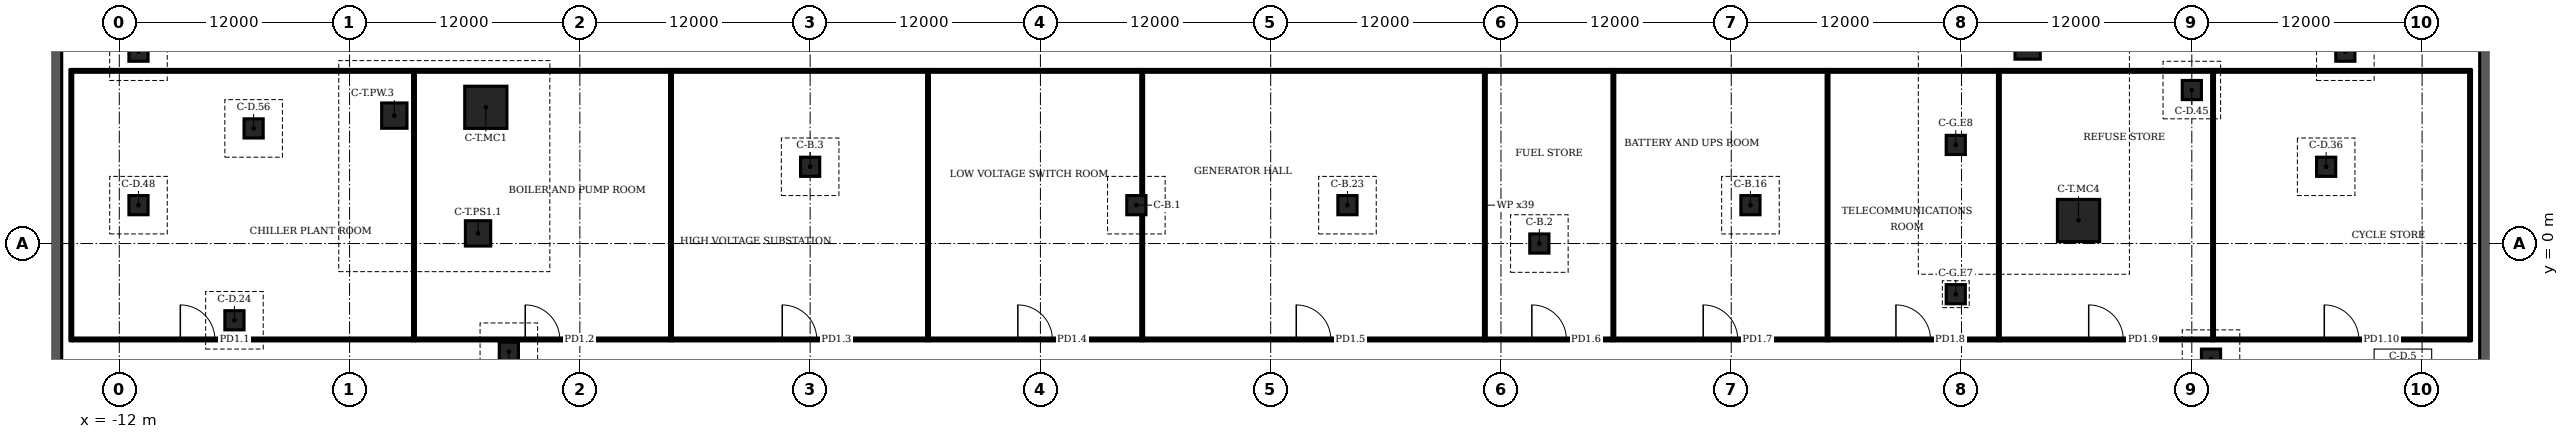
"""IFC4 building model, lengths in metres.
Left out: names, types, materials, properties, quantities, classifications, styles, units other than length and angle.
Written with IfcOpenShell. Run it as: python <this file> out.ifc"""

import sys

from ifc_helpers import new_model, si_unit, direction, frame, frame_2d, origin, origin_2d, place, context, subcontext, project, spatial, rectangle, extrude, element, fill, save


model = new_model("IFC4")
c1 = context("Model", 3, precision=1e-05, world=origin(), true_north=direction((0.0, 1.0)))
c2 = subcontext(c1, "Body", "Model", "MODEL_VIEW")
j1 = project(units=[si_unit("LENGTHUNIT", "METRE"), si_unit("PLANEANGLEUNIT", "RADIAN")], contexts=[c1])
p1 = place(None, origin())
s1 = spatial("IfcSite", under=j1, at=p1, CompositionType="ELEMENT")
p2 = place(p1, origin())
s2 = spatial("IfcBuilding", under=s1, at=p2, CompositionType="ELEMENT")
p3 = place(p2, frame((0.0, 0.0, -7.2)))
s3 = spatial("IfcBuildingStorey", under=s2, at=p3, CompositionType="ELEMENT", Elevation=-7.2)
for number, where, z_axis, x_axis in (
    (1, (-15.5, -35.0, 0.0), (0.0, 0.0, 1.0), (0.0, 1.0, 0.0)),
    (2, (111.5, -35.0, 0.0), (0.0, 0.0, 1.0), (0.0, 1.0, 0.0)),
):
    element("IfcWall", number, at=place(p3, frame(where, z_axis=z_axis, x_axis=x_axis)), inside=s3, PredefinedType="SOLIDWALL", context=c2, shape_type="SweptSolid", body=[
        extrude(rectangle(XDim=94.0, YDim=1.0, at=frame_2d((47.0, 0.0))), origin(), (0.0, 0.0, 1.0), 6.6),
    ])
for number, where, z_axis, x_axis in (
    (3, (7.1, 7.1, 0.0), (0.0, 0.0, 1.0), (1.0, 0.0, 0.0)),
    (4, (90.096, 1.2, 0.0), (0.0, 0.0, 1.0), (1.0, 0.0, 0.0)),
):
    element("IfcColumn", number, at=place(p3, frame(where, z_axis=z_axis, x_axis=x_axis)), inside=s3, PredefinedType="COLUMN", context=c2, shape_type="SweptSolid", body=[
        extrude(rectangle(XDim=2.2, YDim=2.2, at=origin_2d()), origin(), (0.0, 0.0, 1.0), 7.2),
    ])
for number, where, z_axis, x_axis in (
    (5, (6.694, 0.529, 0.0), (0.0, 0.0, 1.0), (1.0, 0.0, 0.0)),
    (6, (87.445, 10.268, 0.0), (0.0, 0.0, 1.0), (1.0, 0.0, 0.0)),
    (7, (2.332, 6.667, 0.0), (0.0, 0.0, 1.0), (1.0, 0.0, 0.0)),
):
    element("IfcColumn", number, at=place(p3, frame(where, z_axis=z_axis, x_axis=x_axis)), inside=s3, PredefinedType="COLUMN", context=c2, shape_type="SweptSolid", body=[
        extrude(rectangle(XDim=1.32, YDim=1.32, at=origin_2d()), origin(), (0.0, 0.0, 1.0), 7.2),
    ])
for number, where, z_axis, x_axis in (
    (8, (8.3, -5.64, 0.0), (0.0, 0.0, 1.0), (1.0, 0.0, 0.0)),
    (9, (83.7, -2.64, 0.0), (0.0, 0.0, 1.0), (1.0, 0.0, 0.0)),
    (10, (83.7, 5.14, 0.0), (0.0, 0.0, 1.0), (1.0, 0.0, 0.0)),
    (11, (104.0, 10.0, 0.0), (0.0, 0.0, 1.0), (1.0, 0.0, 0.0)),
    (12, (-11.0, 10.0, 0.0), (0.0, 0.0, 1.0), (1.0, 0.0, 0.0)),
    (13, (-6.0, -4.0, 0.0), (0.0, 0.0, 1.0), (1.0, 0.0, 0.0)),
    (14, (97.0, -6.0, 0.0), (0.0, 0.0, 1.0), (1.0, 0.0, 0.0)),
    (15, (103.0, 4.0, 0.0), (0.0, 0.0, 1.0), (1.0, 0.0, 0.0)),
    (16, (96.0, 8.0, 0.0), (0.0, 0.0, 1.0), (1.0, 0.0, 0.0)),
    (17, (-11.0, 2.0, 0.0), (0.0, 0.0, 1.0), (1.0, 0.0, 0.0)),
    (18, (-5.0, 6.0, 0.0), (0.0, 0.0, 1.0), (1.0, 0.0, 0.0)),
    (19, (41.0, 2.0, 0.0), (0.0, 0.0, 1.0), (1.0, 0.0, 0.0)),
    (20, (62.0, 0.0, 0.0), (0.0, 0.0, 1.0), (1.0, 0.0, 0.0)),
    (21, (24.0, 4.0, 0.0), (0.0, 0.0, 1.0), (1.0, 0.0, 0.0)),
    (22, (73.0, 2.0, 0.0), (0.0, 0.0, 1.0), (1.0, 0.0, 0.0)),
    (23, (52.0, 2.0, 0.0), (0.0, 0.0, 1.0), (1.0, 0.0, 0.0)),
):
    element("IfcColumn", number, at=place(p3, frame(where, z_axis=z_axis, x_axis=x_axis)), inside=s3, PredefinedType="COLUMN", context=c2, shape_type="SweptSolid", body=[
        extrude(rectangle(XDim=1.0, YDim=1.0, at=origin_2d()), origin(), (0.0, 0.0, 1.0), 7.2),
    ])
p4 = place(p3, frame((-14.425, -5.0, 0.0), z_axis=(0.0, 0.0, 1.0), x_axis=(1.0, 0.0, 0.0)))
e24 = element("IfcWall", 24, at=p4, inside=s3, PredefinedType="PARTITIONING", context=c2, shape_type="SweptSolid", body=[
    extrude(rectangle(XDim=17.707, YDim=0.15, at=frame_2d((8.854, 0.0))), origin(), (0.0, 0.0, 1.0), 6.9),
])
p5 = place(p4, frame((5.605, 0.0, 0.0)))
e25 = element("IfcOpeningElement", 25, at=p5, cuts=e24, PredefinedType="OPENING", context=c2, shape_type="SweptSolid", body=[
    extrude(rectangle(XDim=1.8, YDim=2.1, at=frame_2d((0.9, 1.05))), frame((0.0, 0.085, 0.0), z_axis=(0.0, -1.0, 0.0), x_axis=(1.0, 0.0, 0.0)), (0.0, 0.0, 1.0), 0.17),
])
p6 = place(p3, frame((3.432, -5.0, 0.0), z_axis=(0.0, 0.0, 1.0), x_axis=(1.0, 0.0, 0.0)))
e26 = element("IfcWall", 26, at=p6, inside=s3, PredefinedType="PARTITIONING", context=c2, shape_type="SweptSolid", body=[
    extrude(rectangle(XDim=13.243, YDim=0.15, at=frame_2d((6.622, 0.0))), origin(), (0.0, 0.0, 1.0), 6.9),
])
p7 = place(p6, frame((5.722, 0.0, 0.0)))
e27 = element("IfcOpeningElement", 27, at=p7, cuts=e26, PredefinedType="OPENING", context=c2, shape_type="SweptSolid", body=[
    extrude(rectangle(XDim=1.8, YDim=2.1, at=frame_2d((0.9, 1.05))), frame((0.0, 0.085, 0.0), z_axis=(0.0, -1.0, 0.0), x_axis=(1.0, 0.0, 0.0)), (0.0, 0.0, 1.0), 0.17),
])
p8 = place(p3, frame((16.825, -5.0, 0.0), z_axis=(0.0, 0.0, 1.0), x_axis=(1.0, 0.0, 0.0)))
e28 = element("IfcWall", 28, at=p8, inside=s3, PredefinedType="PARTITIONING", context=c2, shape_type="SweptSolid", body=[
    extrude(rectangle(XDim=13.243, YDim=0.15, at=frame_2d((6.622, 0.0))), origin(), (0.0, 0.0, 1.0), 6.9),
])
p9 = place(p8, frame((5.721, 0.0, 0.0)))
e29 = element("IfcOpeningElement", 29, at=p9, cuts=e28, PredefinedType="OPENING", context=c2, shape_type="SweptSolid", body=[
    extrude(rectangle(XDim=1.8, YDim=2.1, at=frame_2d((0.9, 1.05))), frame((0.0, 0.085, 0.0), z_axis=(0.0, -1.0, 0.0), x_axis=(1.0, 0.0, 0.0)), (0.0, 0.0, 1.0), 0.17),
])
p10 = place(p3, frame((30.218, -5.0, 0.0), z_axis=(0.0, 0.0, 1.0), x_axis=(1.0, 0.0, 0.0)))
e30 = element("IfcWall", 30, at=p10, inside=s3, PredefinedType="PARTITIONING", context=c2, shape_type="SweptSolid", body=[
    extrude(rectangle(XDim=11.011, YDim=0.15, at=frame_2d((5.505, 0.0))), origin(), (0.0, 0.0, 1.0), 6.9),
])
p11 = place(p10, frame((4.605, 0.0, 0.0)))
e31 = element("IfcOpeningElement", 31, at=p11, cuts=e30, PredefinedType="OPENING", context=c2, shape_type="SweptSolid", body=[
    extrude(rectangle(XDim=1.8, YDim=2.1, at=frame_2d((0.9, 1.05))), frame((0.0, 0.085, 0.0), z_axis=(0.0, -1.0, 0.0), x_axis=(1.0, 0.0, 0.0)), (0.0, 0.0, 1.0), 0.17),
])
p12 = place(p3, frame((41.379, -5.0, 0.0), z_axis=(0.0, 0.0, 1.0), x_axis=(1.0, 0.0, 0.0)))
e32 = element("IfcWall", 32, at=p12, inside=s3, PredefinedType="PARTITIONING", context=c2, shape_type="SweptSolid", body=[
    extrude(rectangle(XDim=17.707, YDim=0.15, at=frame_2d((8.854, 0.0))), origin(), (0.0, 0.0, 1.0), 6.9),
])
p13 = place(p12, frame((7.953, 0.0, 0.0)))
e33 = element("IfcOpeningElement", 33, at=p13, cuts=e32, PredefinedType="OPENING", context=c2, shape_type="SweptSolid", body=[
    extrude(rectangle(XDim=1.8, YDim=2.1, at=frame_2d((0.9, 1.05))), frame((0.0, 0.085, 0.0), z_axis=(0.0, -1.0, 0.0), x_axis=(1.0, 0.0, 0.0)), (0.0, 0.0, 1.0), 0.17),
])
p14 = place(p3, frame((59.236, -5.0, 0.0), z_axis=(0.0, 0.0, 1.0), x_axis=(1.0, 0.0, 0.0)))
e34 = element("IfcWall", 34, at=p14, inside=s3, PredefinedType="PARTITIONING", context=c2, shape_type="SweptSolid", body=[
    extrude(rectangle(XDim=6.546, YDim=0.15, at=frame_2d((3.273, 0.0))), origin(), (0.0, 0.0, 1.0), 6.9),
])
p15 = place(p14, frame((2.373, 0.0, 0.0)))
e35 = element("IfcOpeningElement", 35, at=p15, cuts=e34, PredefinedType="OPENING", context=c2, shape_type="SweptSolid", body=[
    extrude(rectangle(XDim=1.8, YDim=2.1, at=frame_2d((0.9, 1.05))), frame((0.0, 0.085, 0.0), z_axis=(0.0, -1.0, 0.0), x_axis=(1.0, 0.0, 0.0)), (0.0, 0.0, 1.0), 0.17),
])
p16 = place(p3, frame((65.932, -5.0, 0.0), z_axis=(0.0, 0.0, 1.0), x_axis=(1.0, 0.0, 0.0)))
e36 = element("IfcWall", 36, at=p16, inside=s3, PredefinedType="PARTITIONING", context=c2, shape_type="SweptSolid", body=[
    extrude(rectangle(XDim=11.011, YDim=0.15, at=frame_2d((5.506, 0.0))), origin(), (0.0, 0.0, 1.0), 6.9),
])
p17 = place(p16, frame((4.605, 0.0, 0.0)))
e37 = element("IfcOpeningElement", 37, at=p17, cuts=e36, PredefinedType="OPENING", context=c2, shape_type="SweptSolid", body=[
    extrude(rectangle(XDim=1.8, YDim=2.1, at=frame_2d((0.9, 1.05))), frame((0.0, 0.085, 0.0), z_axis=(0.0, -1.0, 0.0), x_axis=(1.0, 0.0, 0.0)), (0.0, 0.0, 1.0), 0.17),
])
p18 = place(p3, frame((77.093, -5.0, 0.0), z_axis=(0.0, 0.0, 1.0), x_axis=(1.0, 0.0, 0.0)))
e38 = element("IfcWall", 38, at=p18, inside=s3, PredefinedType="PARTITIONING", context=c2, shape_type="SweptSolid", body=[
    extrude(rectangle(XDim=8.778, YDim=0.15, at=frame_2d((4.389, 0.0))), origin(), (0.0, 0.0, 1.0), 6.9),
])
p19 = place(p18, frame((3.489, 0.0, 0.0)))
e39 = element("IfcOpeningElement", 39, at=p19, cuts=e38, PredefinedType="OPENING", context=c2, shape_type="SweptSolid", body=[
    extrude(rectangle(XDim=1.8, YDim=2.1, at=frame_2d((0.9, 1.05))), frame((0.0, 0.085, 0.0), z_axis=(0.0, -1.0, 0.0), x_axis=(1.0, 0.0, 0.0)), (0.0, 0.0, 1.0), 0.17),
])
p20 = place(p3, frame((86.021, -5.0, 0.0), z_axis=(0.0, 0.0, 1.0), x_axis=(1.0, 0.0, 0.0)))
e40 = element("IfcWall", 40, at=p20, inside=s3, PredefinedType="PARTITIONING", context=c2, shape_type="SweptSolid", body=[
    extrude(rectangle(XDim=11.011, YDim=0.15, at=frame_2d((5.505, 0.0))), origin(), (0.0, 0.0, 1.0), 6.9),
])
p21 = place(p20, frame((4.606, 0.0, 0.0)))
e41 = element("IfcOpeningElement", 41, at=p21, cuts=e40, PredefinedType="OPENING", context=c2, shape_type="SweptSolid", body=[
    extrude(rectangle(XDim=1.8, YDim=2.1, at=frame_2d((0.9, 1.05))), frame((0.0, 0.085, 0.0), z_axis=(0.0, -1.0, 0.0), x_axis=(1.0, 0.0, 0.0)), (0.0, 0.0, 1.0), 0.17),
])
p22 = place(p3, frame((97.182, -5.0, 0.0), z_axis=(0.0, 0.0, 1.0), x_axis=(1.0, 0.0, 0.0)))
e42 = element("IfcWall", 42, at=p22, inside=s3, PredefinedType="PARTITIONING", context=c2, shape_type="SweptSolid", body=[
    extrude(rectangle(XDim=13.243, YDim=0.15, at=frame_2d((6.622, 0.0))), origin(), (0.0, 0.0, 1.0), 6.9),
])
p23 = place(p22, frame((5.722, 0.0, 0.0)))
e43 = element("IfcOpeningElement", 43, at=p23, cuts=e42, PredefinedType="OPENING", context=c2, shape_type="SweptSolid", body=[
    extrude(rectangle(XDim=1.8, YDim=2.1, at=frame_2d((0.9, 1.05))), frame((0.0, 0.085, 0.0), z_axis=(0.0, -1.0, 0.0), x_axis=(1.0, 0.0, 0.0)), (0.0, 0.0, 1.0), 0.17),
])
p24 = place(p3, frame((3.357, -5.075, 0.0), z_axis=(0.0, 0.0, 1.0), x_axis=(0.0, 1.0, 0.0)))
e44 = element("IfcWall", 44, at=p24, inside=s3, PredefinedType="PARTITIONING", context=c2, shape_type="SweptSolid", body=[
    extrude(rectangle(XDim=14.15, YDim=0.15, at=frame_2d((7.075, 0.0))), origin(), (0.0, 0.0, 1.0), 6.9),
])
p25 = place(p3, frame((-14.425, 9.0, 0.0), z_axis=(0.0, 0.0, 1.0), x_axis=(1.0, 0.0, 0.0)))
e45 = element("IfcWall", 45, at=p25, inside=s3, PredefinedType="PARTITIONING", context=c2, shape_type="SweptSolid", body=[
    extrude(rectangle(XDim=17.707, YDim=0.15, at=frame_2d((8.854, 0.0))), origin(), (0.0, 0.0, 1.0), 6.9),
])
for number, where, z_axis, x_axis in (
    (46, (3.432, 9.0, 0.0), (0.0, 0.0, 1.0), (1.0, 0.0, 0.0)),
    (47, (16.825, 9.0, 0.0), (0.0, 0.0, 1.0), (1.0, 0.0, 0.0)),
):
    element("IfcWall", number, at=place(p3, frame(where, z_axis=z_axis, x_axis=x_axis)), inside=s3, PredefinedType="PARTITIONING", context=c2, shape_type="SweptSolid", body=[
        extrude(rectangle(XDim=13.243, YDim=0.15, at=frame_2d((6.622, 0.0))), origin(), (0.0, 0.0, 1.0), 6.9),
    ])
p26 = place(p3, frame((30.218, 9.0, 0.0), z_axis=(0.0, 0.0, 1.0), x_axis=(1.0, 0.0, 0.0)))
e48 = element("IfcWall", 48, at=p26, inside=s3, PredefinedType="PARTITIONING", context=c2, shape_type="SweptSolid", body=[
    extrude(rectangle(XDim=11.011, YDim=0.15, at=frame_2d((5.505, 0.0))), origin(), (0.0, 0.0, 1.0), 6.9),
])
p27 = place(p3, frame((41.379, 9.0, 0.0), z_axis=(0.0, 0.0, 1.0), x_axis=(1.0, 0.0, 0.0)))
e49 = element("IfcWall", 49, at=p27, inside=s3, PredefinedType="PARTITIONING", context=c2, shape_type="SweptSolid", body=[
    extrude(rectangle(XDim=17.707, YDim=0.15, at=frame_2d((8.854, 0.0))), origin(), (0.0, 0.0, 1.0), 6.9),
])
p28 = place(p3, frame((59.236, 9.0, 0.0), z_axis=(0.0, 0.0, 1.0), x_axis=(1.0, 0.0, 0.0)))
e50 = element("IfcWall", 50, at=p28, inside=s3, PredefinedType="PARTITIONING", context=c2, shape_type="SweptSolid", body=[
    extrude(rectangle(XDim=6.546, YDim=0.15, at=frame_2d((3.273, 0.0))), origin(), (0.0, 0.0, 1.0), 6.9),
])
p29 = place(p3, frame((65.932, 9.0, 0.0), z_axis=(0.0, 0.0, 1.0), x_axis=(1.0, 0.0, 0.0)))
e51 = element("IfcWall", 51, at=p29, inside=s3, PredefinedType="PARTITIONING", context=c2, shape_type="SweptSolid", body=[
    extrude(rectangle(XDim=11.011, YDim=0.15, at=frame_2d((5.506, 0.0))), origin(), (0.0, 0.0, 1.0), 6.9),
])
p30 = place(p3, frame((77.093, 9.0, 0.0), z_axis=(0.0, 0.0, 1.0), x_axis=(1.0, 0.0, 0.0)))
e52 = element("IfcWall", 52, at=p30, inside=s3, PredefinedType="PARTITIONING", context=c2, shape_type="SweptSolid", body=[
    extrude(rectangle(XDim=8.778, YDim=0.15, at=frame_2d((4.389, 0.0))), origin(), (0.0, 0.0, 1.0), 6.9),
])
p31 = place(p3, frame((86.021, 9.0, 0.0), z_axis=(0.0, 0.0, 1.0), x_axis=(1.0, 0.0, 0.0)))
e53 = element("IfcWall", 53, at=p31, inside=s3, PredefinedType="PARTITIONING", context=c2, shape_type="SweptSolid", body=[
    extrude(rectangle(XDim=11.011, YDim=0.15, at=frame_2d((5.505, 0.0))), origin(), (0.0, 0.0, 1.0), 6.9),
])
p32 = place(p3, frame((97.182, 9.0, 0.0), z_axis=(0.0, 0.0, 1.0), x_axis=(1.0, 0.0, 0.0)))
e54 = element("IfcWall", 54, at=p32, inside=s3, PredefinedType="PARTITIONING", context=c2, shape_type="SweptSolid", body=[
    extrude(rectangle(XDim=13.243, YDim=0.15, at=frame_2d((6.622, 0.0))), origin(), (0.0, 0.0, 1.0), 6.9),
])
for number, where, z_axis, x_axis in (
    (55, (-14.5, -5.075, 0.0), (0.0, 0.0, 1.0), (0.0, 1.0, 0.0)),
    (56, (16.75, -5.075, 0.0), (0.0, 0.0, 1.0), (0.0, 1.0, 0.0)),
    (57, (30.143, -5.075, 0.0), (0.0, 0.0, 1.0), (0.0, 1.0, 0.0)),
):
    element("IfcWall", number, at=place(p3, frame(where, z_axis=z_axis, x_axis=x_axis)), inside=s3, PredefinedType="PARTITIONING", context=c2, shape_type="SweptSolid", body=[
        extrude(rectangle(XDim=14.15, YDim=0.15, at=frame_2d((7.075, 0.0))), origin(), (0.0, 0.0, 1.0), 6.9),
    ])
for number, where, z_axis, x_axis in (
    (58, (41.304, -5.075, 0.0), (0.0, 0.0, 1.0), (0.0, 1.0, 0.0)),
    (59, (41.304, 2.51, 0.0), (0.0, 0.0, 1.0), (0.0, 1.0, 0.0)),
):
    element("IfcWall", number, at=place(p3, frame(where, z_axis=z_axis, x_axis=x_axis)), inside=s3, PredefinedType="PARTITIONING", context=c2, shape_type="SweptSolid", body=[
        extrude(rectangle(XDim=6.565, YDim=0.15, at=frame_2d((3.282, 0.0))), origin(), (0.0, 0.0, 1.0), 6.9),
    ])
for number, where, z_axis, x_axis in (
    (60, (59.161, -5.075, 0.0), (0.0, 0.0, 1.0), (0.0, 1.0, 0.0)),
    (61, (65.857, -5.075, 0.0), (0.0, 0.0, 1.0), (0.0, 1.0, 0.0)),
    (62, (77.018, -5.075, 0.0), (0.0, 0.0, 1.0), (0.0, 1.0, 0.0)),
    (63, (85.946, -5.075, 0.0), (0.0, 0.0, 1.0), (0.0, 1.0, 0.0)),
    (64, (97.107, -5.075, 0.0), (0.0, 0.0, 1.0), (0.0, 1.0, 0.0)),
    (65, (110.5, -5.075, 0.0), (0.0, 0.0, 1.0), (0.0, 1.0, 0.0)),
):
    element("IfcWall", number, at=place(p3, frame(where, z_axis=z_axis, x_axis=x_axis)), inside=s3, PredefinedType="PARTITIONING", context=c2, shape_type="SweptSolid", body=[
        extrude(rectangle(XDim=14.15, YDim=0.15, at=frame_2d((7.075, 0.0))), origin(), (0.0, 0.0, 1.0), 6.9),
    ])
p33 = place(p5, origin())
e66 = element("IfcDoor", 66, at=p33, inside=s3, OperationType="DOUBLE_DOOR_SINGLE_SWING", PredefinedType="DOOR", context=c2, shape_type="SweptSolid", body=[
    extrude(rectangle(XDim=1.8, YDim=2.1, at=frame_2d((0.9, 1.05))), frame((0.0, 0.025, 0.0), z_axis=(0.0, -1.0, 0.0), x_axis=(1.0, 0.0, 0.0)), (0.0, 0.0, 1.0), 0.05),
])
fill(e25, e66)
p34 = place(p7, origin())
e67 = element("IfcDoor", 67, at=p34, inside=s3, OperationType="DOUBLE_DOOR_SINGLE_SWING", PredefinedType="DOOR", context=c2, shape_type="SweptSolid", body=[
    extrude(rectangle(XDim=1.8, YDim=2.1, at=frame_2d((0.9, 1.05))), frame((0.0, 0.025, 0.0), z_axis=(0.0, -1.0, 0.0), x_axis=(1.0, 0.0, 0.0)), (0.0, 0.0, 1.0), 0.05),
])
fill(e27, e67)
p35 = place(p9, origin())
e68 = element("IfcDoor", 68, at=p35, inside=s3, OperationType="DOUBLE_DOOR_SINGLE_SWING", PredefinedType="DOOR", context=c2, shape_type="SweptSolid", body=[
    extrude(rectangle(XDim=1.8, YDim=2.1, at=frame_2d((0.9, 1.05))), frame((0.0, 0.025, 0.0), z_axis=(0.0, -1.0, 0.0), x_axis=(1.0, 0.0, 0.0)), (0.0, 0.0, 1.0), 0.05),
])
fill(e29, e68)
p36 = place(p11, origin())
e69 = element("IfcDoor", 69, at=p36, inside=s3, OperationType="DOUBLE_DOOR_SINGLE_SWING", PredefinedType="DOOR", context=c2, shape_type="SweptSolid", body=[
    extrude(rectangle(XDim=1.8, YDim=2.1, at=frame_2d((0.9, 1.05))), frame((0.0, 0.025, 0.0), z_axis=(0.0, -1.0, 0.0), x_axis=(1.0, 0.0, 0.0)), (0.0, 0.0, 1.0), 0.05),
])
fill(e31, e69)
p37 = place(p13, origin())
e70 = element("IfcDoor", 70, at=p37, inside=s3, OperationType="DOUBLE_DOOR_SINGLE_SWING", PredefinedType="DOOR", context=c2, shape_type="SweptSolid", body=[
    extrude(rectangle(XDim=1.8, YDim=2.1, at=frame_2d((0.9, 1.05))), frame((0.0, 0.025, 0.0), z_axis=(0.0, -1.0, 0.0), x_axis=(1.0, 0.0, 0.0)), (0.0, 0.0, 1.0), 0.05),
])
fill(e33, e70)
p38 = place(p15, origin())
e71 = element("IfcDoor", 71, at=p38, inside=s3, OperationType="DOUBLE_DOOR_SINGLE_SWING", PredefinedType="DOOR", context=c2, shape_type="SweptSolid", body=[
    extrude(rectangle(XDim=1.8, YDim=2.1, at=frame_2d((0.9, 1.05))), frame((0.0, 0.025, 0.0), z_axis=(0.0, -1.0, 0.0), x_axis=(1.0, 0.0, 0.0)), (0.0, 0.0, 1.0), 0.05),
])
fill(e35, e71)
p39 = place(p17, origin())
e72 = element("IfcDoor", 72, at=p39, inside=s3, OperationType="DOUBLE_DOOR_SINGLE_SWING", PredefinedType="DOOR", context=c2, shape_type="SweptSolid", body=[
    extrude(rectangle(XDim=1.8, YDim=2.1, at=frame_2d((0.9, 1.05))), frame((0.0, 0.025, 0.0), z_axis=(0.0, -1.0, 0.0), x_axis=(1.0, 0.0, 0.0)), (0.0, 0.0, 1.0), 0.05),
])
fill(e37, e72)
p40 = place(p19, origin())
e73 = element("IfcDoor", 73, at=p40, inside=s3, OperationType="DOUBLE_DOOR_SINGLE_SWING", PredefinedType="DOOR", context=c2, shape_type="SweptSolid", body=[
    extrude(rectangle(XDim=1.8, YDim=2.1, at=frame_2d((0.9, 1.05))), frame((0.0, 0.025, 0.0), z_axis=(0.0, -1.0, 0.0), x_axis=(1.0, 0.0, 0.0)), (0.0, 0.0, 1.0), 0.05),
])
fill(e39, e73)
p41 = place(p21, origin())
e74 = element("IfcDoor", 74, at=p41, inside=s3, OperationType="DOUBLE_DOOR_SINGLE_SWING", PredefinedType="DOOR", context=c2, shape_type="SweptSolid", body=[
    extrude(rectangle(XDim=1.8, YDim=2.1, at=frame_2d((0.9, 1.05))), frame((0.0, 0.025, 0.0), z_axis=(0.0, -1.0, 0.0), x_axis=(1.0, 0.0, 0.0)), (0.0, 0.0, 1.0), 0.05),
])
fill(e41, e74)
p42 = place(p23, origin())
e75 = element("IfcDoor", 75, at=p42, inside=s3, OperationType="DOUBLE_DOOR_SINGLE_SWING", PredefinedType="DOOR", context=c2, shape_type="SweptSolid", body=[
    extrude(rectangle(XDim=1.8, YDim=2.1, at=frame_2d((0.9, 1.05))), frame((0.0, 0.025, 0.0), z_axis=(0.0, -1.0, 0.0), x_axis=(1.0, 0.0, 0.0)), (0.0, 0.0, 1.0), 0.05),
])
fill(e43, e75)
save(model, sys.argv[1])
